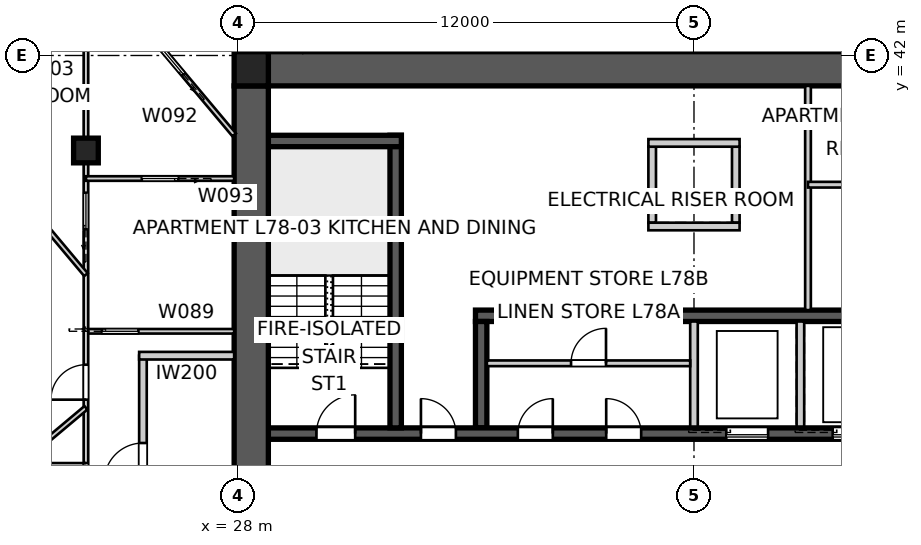
"""IFC4 building model, lengths in metres.
Left out: names, types, materials, properties, quantities, classifications, styles, units other than length and angle.
Written with IfcOpenShell. Run it as: python <this file> out.ifc"""

import sys

from ifc_helpers import new_model, si_unit, direction, frame, frame_2d, origin, origin_2d, place, context, subcontext, project, spatial, polyline, rectangle, outline, extrude, element, fill, save


model = new_model("IFC4")
c1 = context("Model", 3, precision=1e-05, world=origin(), true_north=direction((0.0, 1.0)))
c2 = subcontext(c1, "Body", "Model", "MODEL_VIEW")
j1 = project(units=[si_unit("LENGTHUNIT", "METRE"), si_unit("PLANEANGLEUNIT", "RADIAN")], contexts=[c1])
p1 = place(None, origin())
s1 = spatial("IfcSite", under=j1, at=p1, CompositionType="ELEMENT")
p2 = place(p1, origin())
s2 = spatial("IfcBuilding", under=s1, at=p2, CompositionType="ELEMENT")
p3 = place(p2, frame((0.0, 0.0, 282.8)))
s3 = spatial("IfcBuildingStorey", under=s2, at=p3, CompositionType="ELEMENT", Elevation=282.8)
p4 = place(p3, frame((28.8, 41.65, 0.0), z_axis=(0.0, 0.0, 1.0), x_axis=(1.0, 0.0, 0.0)))
e1 = element("IfcWall", 1, at=p4, inside=s3, PredefinedType="SHEAR", context=c2, shape_type="SweptSolid", body=[
    extrude(outline(polyline([(0.0, -0.45), (22.4, -0.45), (22.4, -0.025), (22.85, -0.025), (22.85, 0.025), (22.4, 0.025), (22.4, 0.45), (0.0, 0.45), (0.0, 0.025), (-0.45, 0.025), (-0.45, -0.025), (0.0, -0.025), (0.0, -0.45)])), origin(), (0.0, 0.0, 1.0), 3.4),
])
p5 = place(p3, frame((28.35, 41.2, 0.0), z_axis=(0.0, 0.0, 1.0), x_axis=(0.0, -1.0, 0.0)))
e2 = element("IfcWall", 2, at=p5, inside=s3, PredefinedType="SHEAR", context=c2, shape_type="SweptSolid", body=[
    extrude(outline(polyline([(0.0, -0.45), (22.4, -0.45), (22.4, -0.025), (22.85, -0.025), (22.85, 0.025), (22.4, 0.025), (22.4, 0.45), (0.0, 0.45), (0.0, 0.025), (-0.45, 0.025), (-0.45, -0.025), (0.0, -0.025), (0.0, -0.45)])), origin(), (0.0, 0.0, 1.0), 3.4),
])
p6 = place(p5, frame((11.14, 0.0, 0.0)))
e3 = element("IfcOpeningElement", 3, at=p6, cuts=e2, PredefinedType="OPENING", context=c2, shape_type="SweptSolid", body=[
    extrude(rectangle(XDim=1.02, YDim=2.4, at=frame_2d((0.51, 1.2))), frame((0.0, 0.46, 0.0), z_axis=(0.0, -1.0, 0.0), x_axis=(1.0, 0.0, 0.0)), (0.0, 0.0, 1.0), 0.92),
])
p7 = place(p3, frame((28.8, 32.05, 0.0), z_axis=(0.0, 0.0, 1.0), x_axis=(1.0, 0.0, 0.0)))
e4 = element("IfcWall", 4, at=p7, inside=s3, PredefinedType="SHEAR", context=c2, shape_type="SweptSolid", body=[
    extrude(rectangle(XDim=22.4, YDim=0.3, at=frame_2d((11.2, 0.0))), origin(), (0.0, 0.0, 1.0), 3.4),
])
p8 = place(p7, frame((19.04, 0.0, 0.0)))
e5 = element("IfcOpeningElement", 5, at=p8, cuts=e4, PredefinedType="OPENING", context=c2, shape_type="SweptSolid", body=[
    extrude(rectangle(XDim=0.92, YDim=2.1, at=frame_2d((0.46, 1.05))), frame((0.0, 0.16, 0.0), z_axis=(0.0, -1.0, 0.0), x_axis=(1.0, 0.0, 0.0)), (0.0, 0.0, 1.0), 0.32),
])
p9 = place(p7, frame((1.265, 0.0, 0.0)))
e6 = element("IfcOpeningElement", 6, at=p9, cuts=e4, PredefinedType="OPENING", context=c2, shape_type="SweptSolid", body=[
    extrude(rectangle(XDim=1.02, YDim=2.1, at=frame_2d((0.51, 1.05))), frame((0.0, 0.16, 0.0), z_axis=(0.0, -1.0, 0.0), x_axis=(1.0, 0.0, 0.0)), (0.0, 0.0, 1.0), 0.32),
])
p10 = place(p7, frame((4.015, 0.0, 0.0)))
e7 = element("IfcOpeningElement", 7, at=p10, cuts=e4, PredefinedType="OPENING", context=c2, shape_type="SweptSolid", body=[
    extrude(rectangle(XDim=0.92, YDim=2.1, at=frame_2d((0.46, 1.05))), frame((0.0, 0.16, 0.0), z_axis=(0.0, -1.0, 0.0), x_axis=(1.0, 0.0, 0.0)), (0.0, 0.0, 1.0), 0.32),
])
p11 = place(p7, frame((6.565, 0.0, 0.0)))
e8 = element("IfcOpeningElement", 8, at=p11, cuts=e4, PredefinedType="OPENING", context=c2, shape_type="SweptSolid", body=[
    extrude(rectangle(XDim=0.92, YDim=2.1, at=frame_2d((0.46, 1.05))), frame((0.0, 0.16, 0.0), z_axis=(0.0, -1.0, 0.0), x_axis=(1.0, 0.0, 0.0)), (0.0, 0.0, 1.0), 0.32),
])
p12 = place(p7, frame((8.89, 0.0, 0.0)))
e9 = element("IfcOpeningElement", 9, at=p12, cuts=e4, PredefinedType="OPENING", context=c2, shape_type="SweptSolid", body=[
    extrude(rectangle(XDim=0.92, YDim=2.1, at=frame_2d((0.46, 1.05))), frame((0.0, 0.16, 0.0), z_axis=(0.0, -1.0, 0.0), x_axis=(1.0, 0.0, 0.0)), (0.0, 0.0, 1.0), 0.32),
])
p13 = place(p7, frame((12.05, 0.0, 0.0)))
e10 = element("IfcOpeningElement", 10, at=p13, cuts=e4, PredefinedType="OPENING", context=c2, shape_type="SweptSolid", body=[
    extrude(rectangle(XDim=1.1, YDim=2.1, at=frame_2d((0.55, 1.05))), frame((0.0, 0.16, 0.0), z_axis=(0.0, -1.0, 0.0), x_axis=(1.0, 0.0, 0.0)), (0.0, 0.0, 1.0), 0.32),
])
p14 = place(p7, frame((14.85, 0.0, 0.0)))
e11 = element("IfcOpeningElement", 11, at=p14, cuts=e4, PredefinedType="OPENING", context=c2, shape_type="SweptSolid", body=[
    extrude(rectangle(XDim=1.1, YDim=2.1, at=frame_2d((0.55, 1.05))), frame((0.0, 0.16, 0.0), z_axis=(0.0, -1.0, 0.0), x_axis=(1.0, 0.0, 0.0)), (0.0, 0.0, 1.0), 0.32),
])
p15 = place(p3, frame((34.25, 35.15, 0.0), z_axis=(0.0, 0.0, 1.0), x_axis=(1.0, 0.0, 0.0)))
e12 = element("IfcWall", 12, at=p15, inside=s3, PredefinedType="SHEAR", context=c2, shape_type="SweptSolid", body=[
    extrude(rectangle(XDim=11.5, YDim=0.3, at=frame_2d((5.75, 0.0))), origin(), (0.0, 0.0, 1.0), 3.4),
])
p16 = place(p3, frame((34.4, 32.2, 0.0), z_axis=(0.0, 0.0, 1.0), x_axis=(0.0, 1.0, 0.0)))
e13 = element("IfcWall", 13, at=p16, inside=s3, PredefinedType="SHEAR", context=c2, shape_type="SweptSolid", body=[
    extrude(rectangle(XDim=2.8, YDim=0.3, at=frame_2d((1.4, 0.0))), origin(), (0.0, 0.0, 1.0), 3.4),
])
for number, where, z_axis, x_axis in (
    (14, (40.0, 32.2, 0.0), (0.0, 0.0, 1.0), (0.0, 1.0, 0.0)),
    (15, (42.8, 32.2, 0.0), (0.0, 0.0, 1.0), (0.0, 1.0, 0.0)),
):
    element("IfcWall", number, at=place(p3, frame(where, z_axis=z_axis, x_axis=x_axis)), inside=s3, PredefinedType="SOLIDWALL", context=c2, shape_type="SweptSolid", body=[
        extrude(rectangle(XDim=2.8, YDim=0.2, at=frame_2d((1.4, 0.0))), origin(), (0.0, 0.0, 1.0), 3.4),
    ])
p17 = place(p3, frame((32.15, 32.2, 0.0), z_axis=(0.0, 0.0, 1.0), x_axis=(0.0, 1.0, 0.0)))
e16 = element("IfcWall", 16, at=p17, inside=s3, PredefinedType="SHEAR", context=c2, shape_type="SweptSolid", body=[
    extrude(rectangle(XDim=7.7, YDim=0.3, at=frame_2d((3.85, 0.0))), origin(), (0.0, 0.0, 1.0), 3.4),
])
p18 = place(p3, frame((28.8, 39.75, 0.0), z_axis=(0.0, 0.0, 1.0), x_axis=(1.0, 0.0, 0.0)))
e17 = element("IfcWall", 17, at=p18, inside=s3, PredefinedType="SHEAR", context=c2, shape_type="SweptSolid", body=[
    extrude(rectangle(XDim=3.5, YDim=0.3, at=frame_2d((1.75, 0.0))), origin(), (0.0, 0.0, 1.0), 3.4),
])
for number, where, z_axis, x_axis in (
    (18, (38.9, 37.6, 0.0), (0.0, 0.0, 1.0), (0.0, 1.0, 0.0)),
    (19, (41.1, 37.6, 0.0), (0.0, 0.0, 1.0), (0.0, 1.0, 0.0)),
):
    element("IfcWall", number, at=place(p3, frame(where, z_axis=z_axis, x_axis=x_axis)), inside=s3, PredefinedType="SOLIDWALL", context=c2, shape_type="SweptSolid", body=[
        extrude(rectangle(XDim=2.0, YDim=0.2, at=frame_2d((1.0, 0.0))), origin(), (0.0, 0.0, 1.0), 3.4),
    ])
for number, where, z_axis, x_axis in (
    (20, (38.8, 37.5, 0.0), (0.0, 0.0, 1.0), (1.0, 0.0, 0.0)),
    (21, (38.8, 39.7, 0.0), (0.0, 0.0, 1.0), (1.0, 0.0, 0.0)),
):
    element("IfcWall", number, at=place(p3, frame(where, z_axis=z_axis, x_axis=x_axis)), inside=s3, PredefinedType="SOLIDWALL", context=c2, shape_type="SweptSolid", body=[
        extrude(rectangle(XDim=2.4, YDim=0.2, at=frame_2d((1.2, 0.0))), origin(), (0.0, 0.0, 1.0), 3.4),
    ])
p19 = place(p3, frame((28.35, 41.65, 0.0), z_axis=(0.0, 0.0, 1.0), x_axis=(1.0, 0.0, 0.0)))
e22 = element("IfcColumn", 22, at=p19, inside=s3, PredefinedType="COLUMN", context=c2, shape_type="SweptSolid", body=[
    extrude(rectangle(XDim=0.9, YDim=0.9, at=origin_2d()), origin(), (0.0, 0.0, 1.0), 3.4),
])
p20 = place(p3, frame((24.0, 39.5, 0.0), z_axis=(0.0, 0.0, 1.0), x_axis=(1.0, 0.0, 0.0)))
e23 = element("IfcColumn", 23, at=p20, inside=s3, PredefinedType="COLUMN", context=c2, shape_type="SweptSolid", body=[
    extrude(rectangle(XDim=0.65, YDim=0.65, at=origin_2d()), origin(), (0.0, 0.0, 1.0), 3.4),
])
p21 = place(p3, frame((25.5, 25.9, 0.0), z_axis=(0.0, 0.0, 1.0), x_axis=(0.0, 1.0, 0.0)))
e24 = element("IfcWall", 24, at=p21, inside=s3, PredefinedType="PARTITIONING", context=c2, shape_type="SweptSolid", body=[
    extrude(rectangle(XDim=8.2, YDim=0.2, at=frame_2d((4.1, 0.0))), origin(), (0.0, 0.0, 1.0), 3.25),
])
p22 = place(p21, frame((4.882, 0.0, 0.0)))
e25 = element("IfcOpeningElement", 25, at=p22, cuts=e24, PredefinedType="OPENING", context=c2, shape_type="SweptSolid", body=[
    extrude(rectangle(XDim=1.02, YDim=2.34, at=frame_2d((0.51, 1.17))), frame((0.0, 0.11, 0.0), z_axis=(0.0, -1.0, 0.0), x_axis=(1.0, 0.0, 0.0)), (0.0, 0.0, 1.0), 0.22),
])
p23 = place(p3, frame((27.9, 34.1, 0.0), z_axis=(0.0, 0.0, 1.0), x_axis=(-1.0, 0.0, 0.0)))
e26 = element("IfcWall", 26, at=p23, inside=s3, PredefinedType="PARTITIONING", context=c2, shape_type="SweptSolid", body=[
    extrude(rectangle(XDim=2.5, YDim=0.2, at=frame_2d((1.25, 0.0))), origin(), (0.0, 0.0, 1.0), 3.25),
])
p24 = place(p3, frame((26.823, 45.704, 0.0), z_axis=(0.0, 0.0, 1.0), x_axis=(0.64279957712, -0.76603440109, 0.0)))
e27 = element("IfcWall", 27, at=p24, inside=s3, PredefinedType="PARTITIONING", context=c2, shape_type="SweptSolid", body=[
    extrude(rectangle(XDim=4.64, YDim=0.25, at=frame_2d((2.32, 0.0))), origin(), (0.0, 0.0, 1.0), 3.25),
])
p25 = place(p3, frame((43.0, 41.2, 0.0), z_axis=(0.0, 0.0, 1.0), x_axis=(0.0, -1.0, 0.0)))
e28 = element("IfcWall", 28, at=p25, inside=s3, PredefinedType="SOLIDWALL", context=c2, shape_type="SweptSolid", body=[
    extrude(rectangle(XDim=5.9, YDim=0.15, at=frame_2d((2.95, 0.0))), origin(), (0.0, 0.0, 1.0), 3.25),
])
p26 = place(p3, frame((43.0, 38.6, 0.0), z_axis=(0.0, 0.0, 1.0), x_axis=(1.0, 0.0, 0.0)))
e29 = element("IfcWall", 29, at=p26, inside=s3, PredefinedType="SOLIDWALL", context=c2, shape_type="SweptSolid", body=[
    extrude(rectangle(XDim=8.2, YDim=0.15, at=frame_2d((4.1, 0.0))), origin(), (0.0, 0.0, 1.0), 3.25),
])
p27 = place(p26, frame((3.64, 0.0, 0.0)))
e30 = element("IfcOpeningElement", 30, at=p27, cuts=e29, PredefinedType="OPENING", context=c2, shape_type="SweptSolid", body=[
    extrude(rectangle(XDim=0.92, YDim=2.1, at=frame_2d((0.46, 1.05))), frame((0.0, 0.085, 0.0), z_axis=(0.0, -1.0, 0.0), x_axis=(1.0, 0.0, 0.0)), (0.0, 0.0, 1.0), 0.17),
])
p28 = place(p3, frame((24.0, 34.742, 0.0), z_axis=(0.0, 0.0, 1.0), x_axis=(1.0, 0.0, 0.0)))
e31 = element("IfcWall", 31, at=p28, inside=s3, PredefinedType="PARTITIONING", context=c2, shape_type="SweptSolid", body=[
    extrude(rectangle(XDim=3.9, YDim=0.12, at=frame_2d((1.95, 0.0))), origin(), (0.0, 0.0, 1.0), 3.25),
])
p29 = place(p28, frame((0.42, 0.0, 0.0)))
e32 = element("IfcOpeningElement", 32, at=p29, cuts=e31, PredefinedType="OPENING", context=c2, shape_type="SweptSolid", body=[
    extrude(rectangle(XDim=0.96, YDim=2.1, at=frame_2d((0.48, 1.05))), frame((0.0, 0.07, 0.0), z_axis=(0.0, -1.0, 0.0), x_axis=(1.0, 0.0, 0.0)), (0.0, 0.0, 1.0), 0.14),
])
p30 = place(p3, frame((24.0, 17.238, 0.0), z_axis=(0.0, 0.0, 1.0), x_axis=(0.0, 1.0, 0.0)))
e33 = element("IfcWall", 33, at=p30, inside=s3, PredefinedType="PARTITIONING", context=c2, shape_type="SweptSolid", body=[
    extrude(rectangle(XDim=26.045, YDim=0.12, at=frame_2d((13.022, 0.0))), origin(), (0.0, 0.0, 1.0), 2.549),
])
p31 = place(p30, frame((13.116, 0.0, 0.0)))
e34 = element("IfcOpeningElement", 34, at=p31, cuts=e33, PredefinedType="OPENING", context=c2, shape_type="SweptSolid", body=[
    extrude(rectangle(XDim=0.92, YDim=2.34, at=frame_2d((0.46, 1.17))), frame((0.0, 0.07, 0.0), z_axis=(0.0, -1.0, 0.0), x_axis=(1.0, 0.0, 0.0)), (0.0, 0.0, 1.0), 0.14),
])
p32 = place(p30, frame((15.705, 0.0, 0.0)))
e35 = element("IfcOpeningElement", 35, at=p32, cuts=e33, PredefinedType="OPENING", context=c2, shape_type="SweptSolid", body=[
    extrude(rectangle(XDim=0.92, YDim=2.34, at=frame_2d((0.46, 1.17))), frame((0.0, 0.07, 0.0), z_axis=(0.0, -1.0, 0.0), x_axis=(1.0, 0.0, 0.0)), (0.0, 0.0, 1.0), 0.14),
])
p33 = place(p30, frame((20.191, 0.0, 0.0)))
e36 = element("IfcOpeningElement", 36, at=p33, cuts=e33, PredefinedType="OPENING", context=c2, shape_type="SweptSolid", body=[
    extrude(rectangle(XDim=0.96, YDim=2.1, at=frame_2d((0.48, 1.05))), frame((0.0, 0.07, 0.0), z_axis=(0.0, -1.0, 0.0), x_axis=(1.0, 0.0, 0.0)), (0.0, 0.0, 1.0), 0.14),
])
p34 = place(p30, frame((3.631, 0.0, 0.0)))
e37 = element("IfcOpeningElement", 37, at=p34, cuts=e33, PredefinedType="OPENING", context=c2, shape_type="SweptSolid", body=[
    extrude(rectangle(XDim=0.92, YDim=2.34, at=frame_2d((0.46, 1.17))), frame((0.0, 0.07, 0.0), z_axis=(0.0, -1.0, 0.0), x_axis=(1.0, 0.0, 0.0)), (0.0, 0.0, 1.0), 0.14),
])
p35 = place(p3, frame((27.9, 39.913, 0.0), z_axis=(0.0, 0.0, 1.0), x_axis=(-0.64279031777, 0.766042170759, 0.0)))
e38 = element("IfcWall", 38, at=p35, inside=s3, PredefinedType="PARTITIONING", context=c2, shape_type="SweptSolid", body=[
    extrude(rectangle(XDim=5.089, YDim=0.12, at=frame_2d((2.544, 0.0))), origin(), (0.0, 0.0, 1.0), 3.25),
])
p36 = place(p35, frame((2.084, 0.0, 0.0)))
e39 = element("IfcOpeningElement", 39, at=p36, cuts=e38, PredefinedType="OPENING", context=c2, shape_type="SweptSolid", body=[
    extrude(rectangle(XDim=0.96, YDim=2.1, at=frame_2d((0.48, 1.05))), frame((0.0, 0.07, 0.0), z_axis=(0.0, -1.0, 0.0), x_axis=(1.0, 0.0, 0.0)), (0.0, 0.0, 1.0), 0.14),
])
p37 = place(p3, frame((27.9, 38.762, 0.0), z_axis=(0.0, 0.0, 1.0), x_axis=(-1.0, 0.0, 0.0)))
e40 = element("IfcWall", 40, at=p37, inside=s3, PredefinedType="PARTITIONING", context=c2, shape_type="SweptSolid", body=[
    extrude(rectangle(XDim=3.9, YDim=0.12, at=frame_2d((1.95, 0.0))), origin(), (0.0, 0.0, 1.0), 2.796),
])
p38 = place(p37, frame((1.47, 0.0, 0.0)))
e41 = element("IfcOpeningElement", 41, at=p38, cuts=e40, PredefinedType="OPENING", context=c2, shape_type="SweptSolid", body=[
    extrude(rectangle(XDim=0.96, YDim=2.1, at=frame_2d((0.48, 1.05))), frame((0.0, 0.07, 0.0), z_axis=(0.0, -1.0, 0.0), x_axis=(1.0, 0.0, 0.0)), (0.0, 0.0, 1.0), 0.14),
])
p39 = place(p3, frame((24.0, 32.729, 0.0), z_axis=(0.0, 0.0, 1.0), x_axis=(-0.766044319693, -0.64278775678, 0.0)))
e42 = element("IfcWall", 42, at=p39, inside=s3, PredefinedType="PARTITIONING", context=c2, shape_type="SweptSolid", body=[
    extrude(rectangle(XDim=9.957, YDim=0.12, at=frame_2d((4.979, 0.0))), origin(), (0.0, 0.0, 1.0), 3.25),
])
p40 = place(p3, frame((20.529, 40.37, 0.0), z_axis=(0.0, 0.0, 1.0), x_axis=(0.642799726543, -0.766034275706, 0.0)))
e43 = element("IfcWall", 43, at=p40, inside=s3, PredefinedType="PARTITIONING", context=c2, shape_type="SweptSolid", body=[
    extrude(rectangle(XDim=5.4, YDim=0.12, at=frame_2d((2.7, 0.0))), origin(), (0.0, 0.0, 1.0), 3.25),
])
p41 = place(p3, frame((34.55, 33.9, 0.0), z_axis=(0.0, 0.0, 1.0), x_axis=(1.0, 0.0, 0.0)))
e44 = element("IfcWall", 44, at=p41, inside=s3, PredefinedType="SOLIDWALL", context=c2, shape_type="SweptSolid", body=[
    extrude(rectangle(XDim=5.35, YDim=0.15, at=frame_2d((2.675, 0.0))), origin(), (0.0, 0.0, 1.0), 3.25),
])
p42 = place(p41, frame((2.215, 0.0, 0.0)))
e45 = element("IfcOpeningElement", 45, at=p42, cuts=e44, PredefinedType="OPENING", context=c2, shape_type="SweptSolid", body=[
    extrude(rectangle(XDim=0.92, YDim=2.1, at=frame_2d((0.46, 1.05))), frame((0.0, 0.085, 0.0), z_axis=(0.0, -1.0, 0.0), x_axis=(1.0, 0.0, 0.0)), (0.0, 0.0, 1.0), 0.17),
])
p43 = place(p9, origin())
e46 = element("IfcDoor", 46, at=p43, inside=s3, OperationType="SINGLE_SWING_RIGHT", PredefinedType="DOOR", context=c2, shape_type="SweptSolid", body=[
    extrude(rectangle(XDim=1.02, YDim=2.1, at=frame_2d((0.51, 1.05))), frame((0.0, 0.025, 0.0), z_axis=(0.0, -1.0, 0.0), x_axis=(1.0, 0.0, 0.0)), (0.0, 0.0, 1.0), 0.05),
])
fill(e6, e46)
p44 = place(p10, origin())
e47 = element("IfcDoor", 47, at=p44, inside=s3, OperationType="SINGLE_SWING_LEFT", PredefinedType="DOOR", context=c2, shape_type="SweptSolid", body=[
    extrude(rectangle(XDim=0.92, YDim=2.1, at=frame_2d((0.46, 1.05))), frame((0.0, 0.025, 0.0), z_axis=(0.0, -1.0, 0.0), x_axis=(1.0, 0.0, 0.0)), (0.0, 0.0, 1.0), 0.05),
])
fill(e7, e47)
p45 = place(p22, origin())
e48 = element("IfcDoor", 48, at=p45, inside=s3, OperationType="SINGLE_SWING_LEFT", PredefinedType="DOOR", context=c2, shape_type="SweptSolid", body=[
    extrude(rectangle(XDim=1.02, YDim=2.34, at=frame_2d((0.51, 1.17))), frame((0.0, 0.025, 0.0), z_axis=(0.0, -1.0, 0.0), x_axis=(1.0, 0.0, 0.0)), (0.0, 0.0, 1.0), 0.05),
])
fill(e25, e48)
p46 = place(p31, origin())
e49 = element("IfcDoor", 49, at=p46, inside=s3, OperationType="SINGLE_SWING_RIGHT", PredefinedType="DOOR", context=c2, shape_type="SweptSolid", body=[
    extrude(rectangle(XDim=0.92, YDim=2.34, at=frame_2d((0.46, 1.17))), frame((0.0, 0.025, 0.0), z_axis=(0.0, -1.0, 0.0), x_axis=(1.0, 0.0, 0.0)), (0.0, 0.0, 1.0), 0.05),
])
fill(e34, e49)
p47 = place(p29, origin())
e50 = element("IfcDoor", 50, at=p47, inside=s3, OperationType="SLIDING_TO_LEFT", PredefinedType="DOOR", context=c2, shape_type="SweptSolid", body=[
    extrude(rectangle(XDim=0.96, YDim=2.1, at=frame_2d((0.48, 1.05))), frame((0.0, 0.025, 0.0), z_axis=(0.0, -1.0, 0.0), x_axis=(1.0, 0.0, 0.0)), (0.0, 0.0, 1.0), 0.05),
])
fill(e32, e50)
p48 = place(p32, origin())
e51 = element("IfcDoor", 51, at=p48, inside=s3, OperationType="SINGLE_SWING_LEFT", PredefinedType="DOOR", context=c2, shape_type="SweptSolid", body=[
    extrude(rectangle(XDim=0.92, YDim=2.34, at=frame_2d((0.46, 1.17))), frame((0.0, 0.025, 0.0), z_axis=(0.0, -1.0, 0.0), x_axis=(1.0, 0.0, 0.0)), (0.0, 0.0, 1.0), 0.05),
])
fill(e35, e51)
p49 = place(p38, origin())
e52 = element("IfcDoor", 52, at=p49, inside=s3, OperationType="SLIDING_TO_LEFT", PredefinedType="DOOR", context=c2, shape_type="SweptSolid", body=[
    extrude(rectangle(XDim=0.96, YDim=2.1, at=frame_2d((0.48, 1.05))), frame((0.0, 0.025, 0.0), z_axis=(0.0, -1.0, 0.0), x_axis=(1.0, 0.0, 0.0)), (0.0, 0.0, 1.0), 0.05),
])
fill(e41, e52)
p50 = place(p33, origin())
e53 = element("IfcDoor", 53, at=p50, inside=s3, OperationType="SLIDING_TO_LEFT", PredefinedType="DOOR", context=c2, shape_type="SweptSolid", body=[
    extrude(rectangle(XDim=0.96, YDim=2.1, at=frame_2d((0.48, 1.05))), frame((0.0, 0.025, 0.0), z_axis=(0.0, -1.0, 0.0), x_axis=(1.0, 0.0, 0.0)), (0.0, 0.0, 1.0), 0.05),
])
fill(e36, e53)
p51 = place(p36, origin())
e54 = element("IfcDoor", 54, at=p51, inside=s3, OperationType="SLIDING_TO_LEFT", PredefinedType="DOOR", context=c2, shape_type="SweptSolid", body=[
    extrude(rectangle(XDim=0.96, YDim=2.1, at=frame_2d((0.48, 1.05))), frame((0.0, 0.025, 0.0), z_axis=(0.0, -1.0, 0.0), x_axis=(1.0, 0.0, 0.0)), (0.0, 0.0, 1.0), 0.05),
])
fill(e39, e54)
p52 = place(p11, origin())
e55 = element("IfcDoor", 55, at=p52, inside=s3, OperationType="SINGLE_SWING_RIGHT", PredefinedType="DOOR", context=c2, shape_type="SweptSolid", body=[
    extrude(rectangle(XDim=0.92, YDim=2.1, at=frame_2d((0.46, 1.05))), frame((0.0, 0.025, 0.0), z_axis=(0.0, -1.0, 0.0), x_axis=(1.0, 0.0, 0.0)), (0.0, 0.0, 1.0), 0.05),
])
fill(e8, e55)
p53 = place(p12, origin())
e56 = element("IfcDoor", 56, at=p53, inside=s3, OperationType="SINGLE_SWING_LEFT", PredefinedType="DOOR", context=c2, shape_type="SweptSolid", body=[
    extrude(rectangle(XDim=0.92, YDim=2.1, at=frame_2d((0.46, 1.05))), frame((0.0, 0.025, 0.0), z_axis=(0.0, -1.0, 0.0), x_axis=(1.0, 0.0, 0.0)), (0.0, 0.0, 1.0), 0.05),
])
fill(e9, e56)
p54 = place(p42, origin())
e57 = element("IfcDoor", 57, at=p54, inside=s3, OperationType="SINGLE_SWING_RIGHT", PredefinedType="DOOR", context=c2, shape_type="SweptSolid", body=[
    extrude(rectangle(XDim=0.92, YDim=2.1, at=frame_2d((0.46, 1.05))), frame((0.0, 0.025, 0.0), z_axis=(0.0, -1.0, 0.0), x_axis=(1.0, 0.0, 0.0)), (0.0, 0.0, 1.0), 0.05),
])
fill(e45, e57)
p55 = place(p13, origin())
e58 = element("IfcDoor", 58, at=p55, inside=s3, OperationType="SLIDING_TO_LEFT", PredefinedType="DOOR", context=c2, shape_type="SweptSolid", body=[
    extrude(rectangle(XDim=1.1, YDim=2.1, at=frame_2d((0.55, 1.05))), frame((0.0, 0.025, 0.0), z_axis=(0.0, -1.0, 0.0), x_axis=(1.0, 0.0, 0.0)), (0.0, 0.0, 1.0), 0.05),
])
fill(e10, e58)
p56 = place(p14, origin())
e59 = element("IfcDoor", 59, at=p56, inside=s3, OperationType="SLIDING_TO_LEFT", PredefinedType="DOOR", context=c2, shape_type="SweptSolid", body=[
    extrude(rectangle(XDim=1.1, YDim=2.1, at=frame_2d((0.55, 1.05))), frame((0.0, 0.025, 0.0), z_axis=(0.0, -1.0, 0.0), x_axis=(1.0, 0.0, 0.0)), (0.0, 0.0, 1.0), 0.05),
])
fill(e11, e59)
save(model, sys.argv[1])
